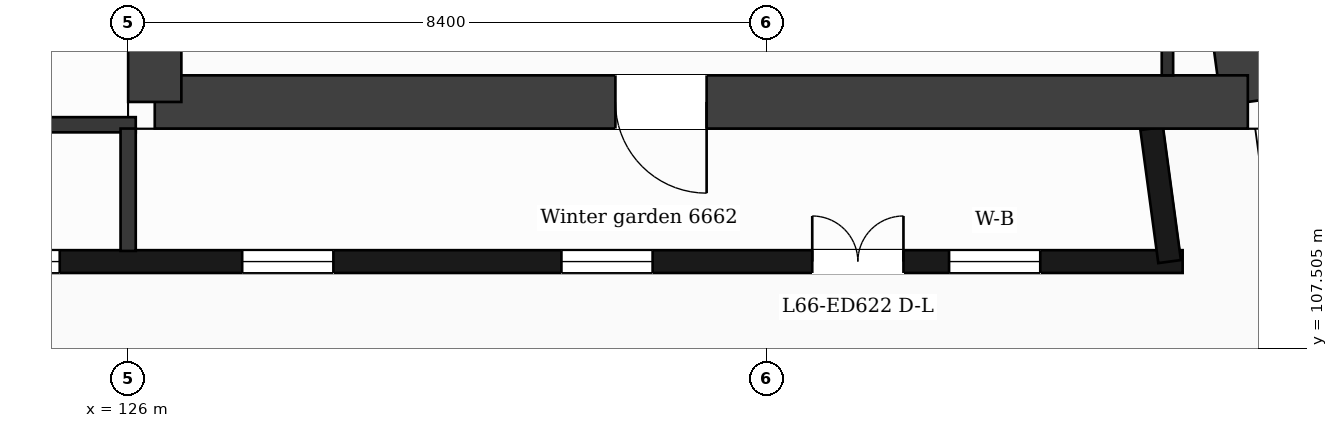
"""IFC4 building model, lengths in metres.
Left out: names, types, materials, properties, quantities, classifications, styles, units other than length and angle.
Written with IfcOpenShell. Run it as: python <this file> out.ifc"""

import sys

from ifc_helpers import new_model, si_unit, direction, frame, frame_2d, origin, place, context, subcontext, project, spatial, rectangle, extrude, element, fill, save


model = new_model("IFC4")
c1 = context("Model", 3, precision=1e-05, world=origin(), true_north=direction((0.0, 1.0)))
c2 = subcontext(c1, "Body", "Model", "MODEL_VIEW")
j1 = project(units=[si_unit("LENGTHUNIT", "METRE"), si_unit("PLANEANGLEUNIT", "RADIAN")], contexts=[c1])
p1 = place(None, origin())
s1 = spatial("IfcSite", under=j1, at=p1, CompositionType="ELEMENT")
p2 = place(p1, origin())
s2 = spatial("IfcBuilding", under=s1, at=p2, CompositionType="ELEMENT")
p3 = place(p2, frame((0.0, 0.0, 273.8)))
s3 = spatial("IfcBuildingStorey", under=s2, at=p3, CompositionType="ELEMENT", Elevation=273.8)
p4 = place(p3, frame((137.863, 132.05, 0.0), z_axis=(0.0, 0.0, 1.0), x_axis=(0.133406218907, -0.991061441464, 0.0)))
e1 = element("IfcWall", 1, at=p4, inside=s3, PredefinedType="SHEAR", context=c2, shape_type="SweptSolid", body=[
    extrude(rectangle(XDim=21.492, YDim=0.7, at=frame_2d((10.746, 0.0))), origin(), (0.0, 0.0, 1.0), 3.7),
])
p5 = place(p3, frame((140.73, 110.75, 0.0), z_axis=(0.0, 0.0, 1.0), x_axis=(-1.0, 0.0, 0.0)))
e2 = element("IfcWall", 2, at=p5, inside=s3, PredefinedType="SHEAR", context=c2, shape_type="SweptSolid", body=[
    extrude(rectangle(XDim=14.38, YDim=0.7, at=frame_2d((7.19, 0.0))), origin(), (0.0, 0.0, 1.0), 3.7),
])
p6 = place(p5, frame((7.12, 0.0, 0.0)))
e3 = element("IfcOpeningElement", 3, at=p6, cuts=e2, PredefinedType="OPENING", context=c2, shape_type="SweptSolid", body=[
    extrude(rectangle(XDim=1.2, YDim=2.1, at=frame_2d((0.6, 1.05))), frame((0.0, 0.36, 0.0), z_axis=(0.0, -1.0, 0.0), x_axis=(1.0, 0.0, 0.0)), (0.0, 0.0, 1.0), 0.72),
])
p7 = place(p3, frame((126.35, 110.75, 0.0), z_axis=(0.0, 0.0, 1.0), x_axis=(0.0, 1.0, 0.0)))
e4 = element("IfcWall", 4, at=p7, inside=s3, PredefinedType="SHEAR", context=c2, shape_type="SweptSolid", body=[
    extrude(rectangle(XDim=21.3, YDim=0.7, at=frame_2d((10.65, 0.0))), origin(), (0.0, 0.0, 1.0), 3.7),
])
p8 = place(p7, frame((12.0, 0.0, 0.0)))
e5 = element("IfcOpeningElement", 5, at=p8, cuts=e4, PredefinedType="OPENING", context=c2, shape_type="SweptSolid", body=[
    extrude(rectangle(XDim=1.4, YDim=2.1, at=frame_2d((0.7, 1.05))), frame((0.0, 0.36, 0.0), z_axis=(0.0, -1.0, 0.0), x_axis=(1.0, 0.0, 0.0)), (0.0, 0.0, 1.0), 0.72),
])
p9 = place(p3, frame((87.099, 108.65, 0.0), z_axis=(0.0, 0.0, 1.0), x_axis=(1.0, 0.0, 0.0)))
e6 = element("IfcWall", 6, at=p9, inside=s3, PredefinedType="SOLIDWALL", context=c2, shape_type="SweptSolid", body=[
    extrude(rectangle(XDim=52.774, YDim=0.3, at=frame_2d((26.387, 0.0))), origin(), (0.0, 0.0, 1.0), 3.38),
])
p10 = place(p9, frame((2.001, 0.0, 0.9)))
e7 = element("IfcOpeningElement", 7, at=p10, cuts=e6, PredefinedType="OPENING", context=c2, shape_type="SweptSolid", body=[
    extrude(rectangle(XDim=2.4, YDim=2.1, at=frame_2d((1.2, 1.05))), frame((0.0, 0.16, 0.0), z_axis=(0.0, -1.0, 0.0), x_axis=(1.0, 0.0, 0.0)), (0.0, 0.0, 1.0), 0.32),
])
p11 = place(p9, frame((6.201, 0.0, 0.9)))
e8 = element("IfcOpeningElement", 8, at=p11, cuts=e6, PredefinedType="OPENING", context=c2, shape_type="SweptSolid", body=[
    extrude(rectangle(XDim=2.4, YDim=2.1, at=frame_2d((1.2, 1.05))), frame((0.0, 0.16, 0.0), z_axis=(0.0, -1.0, 0.0), x_axis=(1.0, 0.0, 0.0)), (0.0, 0.0, 1.0), 0.32),
])
p12 = place(p9, frame((11.001, 0.0, 0.9)))
e9 = element("IfcOpeningElement", 9, at=p12, cuts=e6, PredefinedType="OPENING", context=c2, shape_type="SweptSolid", body=[
    extrude(rectangle(XDim=1.2, YDim=2.1, at=frame_2d((0.6, 1.05))), frame((0.0, 0.16, 0.0), z_axis=(0.0, -1.0, 0.0), x_axis=(1.0, 0.0, 0.0)), (0.0, 0.0, 1.0), 0.32),
])
p13 = place(p9, frame((15.201, 0.0, 0.9)))
e10 = element("IfcOpeningElement", 10, at=p13, cuts=e6, PredefinedType="OPENING", context=c2, shape_type="SweptSolid", body=[
    extrude(rectangle(XDim=1.2, YDim=2.1, at=frame_2d((0.6, 1.05))), frame((0.0, 0.16, 0.0), z_axis=(0.0, -1.0, 0.0), x_axis=(1.0, 0.0, 0.0)), (0.0, 0.0, 1.0), 0.32),
])
p14 = place(p9, frame((18.802, 0.0, 0.9)))
e11 = element("IfcOpeningElement", 11, at=p14, cuts=e6, PredefinedType="OPENING", context=c2, shape_type="SweptSolid", body=[
    extrude(rectangle(XDim=2.4, YDim=2.1, at=frame_2d((1.2, 1.05))), frame((0.0, 0.16, 0.0), z_axis=(0.0, -1.0, 0.0), x_axis=(1.0, 0.0, 0.0)), (0.0, 0.0, 1.0), 0.32),
])
p15 = place(p9, frame((23.001, 0.0, 0.9)))
e12 = element("IfcOpeningElement", 12, at=p15, cuts=e6, PredefinedType="OPENING", context=c2, shape_type="SweptSolid", body=[
    extrude(rectangle(XDim=2.4, YDim=2.1, at=frame_2d((1.2, 1.05))), frame((0.0, 0.16, 0.0), z_axis=(0.0, -1.0, 0.0), x_axis=(1.0, 0.0, 0.0)), (0.0, 0.0, 1.0), 0.32),
])
p16 = place(p9, frame((27.201, 0.0, 0.9)))
e13 = element("IfcOpeningElement", 13, at=p16, cuts=e6, PredefinedType="OPENING", context=c2, shape_type="SweptSolid", body=[
    extrude(rectangle(XDim=2.4, YDim=2.1, at=frame_2d((1.2, 1.05))), frame((0.0, 0.16, 0.0), z_axis=(0.0, -1.0, 0.0), x_axis=(1.0, 0.0, 0.0)), (0.0, 0.0, 1.0), 0.32),
])
p17 = place(p9, frame((31.401, 0.0, 0.9)))
e14 = element("IfcOpeningElement", 14, at=p17, cuts=e6, PredefinedType="OPENING", context=c2, shape_type="SweptSolid", body=[
    extrude(rectangle(XDim=2.4, YDim=2.1, at=frame_2d((1.2, 1.05))), frame((0.0, 0.16, 0.0), z_axis=(0.0, -1.0, 0.0), x_axis=(1.0, 0.0, 0.0)), (0.0, 0.0, 1.0), 0.32),
])
p18 = place(p9, frame((35.602, 0.0, 0.9)))
e15 = element("IfcOpeningElement", 15, at=p18, cuts=e6, PredefinedType="OPENING", context=c2, shape_type="SweptSolid", body=[
    extrude(rectangle(XDim=2.4, YDim=2.1, at=frame_2d((1.2, 1.05))), frame((0.0, 0.16, 0.0), z_axis=(0.0, -1.0, 0.0), x_axis=(1.0, 0.0, 0.0)), (0.0, 0.0, 1.0), 0.32),
])
p19 = place(p9, frame((40.401, 0.0, 0.9)))
e16 = element("IfcOpeningElement", 16, at=p19, cuts=e6, PredefinedType="OPENING", context=c2, shape_type="SweptSolid", body=[
    extrude(rectangle(XDim=1.2, YDim=2.1, at=frame_2d((0.6, 1.05))), frame((0.0, 0.16, 0.0), z_axis=(0.0, -1.0, 0.0), x_axis=(1.0, 0.0, 0.0)), (0.0, 0.0, 1.0), 0.32),
])
p20 = place(p9, frame((44.602, 0.0, 0.9)))
e17 = element("IfcOpeningElement", 17, at=p20, cuts=e6, PredefinedType="OPENING", context=c2, shape_type="SweptSolid", body=[
    extrude(rectangle(XDim=1.2, YDim=2.1, at=frame_2d((0.6, 1.05))), frame((0.0, 0.16, 0.0), z_axis=(0.0, -1.0, 0.0), x_axis=(1.0, 0.0, 0.0)), (0.0, 0.0, 1.0), 0.32),
])
p21 = place(p9, frame((47.901, 0.0, 0.0)))
e18 = element("IfcOpeningElement", 18, at=p21, cuts=e6, PredefinedType="OPENING", context=c2, shape_type="SweptSolid", body=[
    extrude(rectangle(XDim=1.2, YDim=2.4, at=frame_2d((0.6, 1.2))), frame((0.0, 0.16, 0.0), z_axis=(0.0, -1.0, 0.0), x_axis=(1.0, 0.0, 0.0)), (0.0, 0.0, 1.0), 0.32),
])
p22 = place(p9, frame((49.701, 0.0, 0.9)))
e19 = element("IfcOpeningElement", 19, at=p22, cuts=e6, PredefinedType="OPENING", context=c2, shape_type="SweptSolid", body=[
    extrude(rectangle(XDim=1.2, YDim=2.1, at=frame_2d((0.6, 1.05))), frame((0.0, 0.16, 0.0), z_axis=(0.0, -1.0, 0.0), x_axis=(1.0, 0.0, 0.0)), (0.0, 0.0, 1.0), 0.32),
])
p23 = place(p3, frame((139.701, 108.65, 0.0), z_axis=(0.0, 0.0, 1.0), x_axis=(-0.133422458344, 0.991059255347, 0.0)))
e20 = element("IfcWall", 20, at=p23, inside=s3, PredefinedType="SOLIDWALL", context=c2, shape_type="SweptSolid", body=[
    extrude(rectangle(XDim=1.766, YDim=0.3, at=frame_2d((0.883, 0.0))), origin(), (0.0, 0.0, 1.0), 3.38),
])
p24 = place(p3, frame((100.7, 110.45, 0.0), z_axis=(0.0, 0.0, 1.0), x_axis=(1.0, 0.0, 0.0)))
e21 = element("IfcWall", 21, at=p24, inside=s3, PredefinedType="PARTITIONING", context=c2, shape_type="SweptSolid", body=[
    extrude(rectangle(XDim=25.4, YDim=0.2, at=frame_2d((12.7, 0.0))), origin(), (0.0, 0.0, 1.0), 3.38),
])
p25 = place(p3, frame((126.0, 108.79, 0.0), z_axis=(0.0, 0.0, 1.0), x_axis=(0.0, 1.0, 0.0)))
e22 = element("IfcWall", 22, at=p25, inside=s3, PredefinedType="PARTITIONING", context=c2, shape_type="SweptSolid", body=[
    extrude(rectangle(XDim=1.61, YDim=0.2, at=frame_2d((0.805, 0.0))), origin(), (0.0, 0.0, 1.0), 3.38),
])
p26 = place(p3, frame((139.673, 111.1, 0.0), z_axis=(0.0, 0.0, 1.0), x_axis=(0.0, 1.0, 0.0)))
e23 = element("IfcWall", 23, at=p26, inside=s3, PredefinedType="PARTITIONING", context=c2, shape_type="SweptSolid", body=[
    extrude(rectangle(XDim=1.8, YDim=0.15, at=frame_2d((0.9, 0.0))), origin(), (0.0, 0.0, 1.0), 3.38),
])
p27 = place(p18, origin())
e24 = element("IfcWindow", 24, at=p27, inside=s3, PartitioningType="SINGLE_PANEL", PredefinedType="WINDOW", context=c2, shape_type="SweptSolid", body=[
    extrude(rectangle(XDim=2.4, YDim=2.1, at=frame_2d((1.2, 1.05))), frame((0.0, 0.03, 0.0), z_axis=(0.0, -1.0, 0.0), x_axis=(1.0, 0.0, 0.0)), (0.0, 0.0, 1.0), 0.06),
])
fill(e15, e24)
p28 = place(p19, origin())
e25 = element("IfcWindow", 25, at=p28, inside=s3, PartitioningType="SINGLE_PANEL", PredefinedType="WINDOW", context=c2, shape_type="SweptSolid", body=[
    extrude(rectangle(XDim=1.2, YDim=2.1, at=frame_2d((0.6, 1.05))), frame((0.0, 0.03, 0.0), z_axis=(0.0, -1.0, 0.0), x_axis=(1.0, 0.0, 0.0)), (0.0, 0.0, 1.0), 0.06),
])
fill(e16, e25)
p29 = place(p20, origin())
e26 = element("IfcWindow", 26, at=p29, inside=s3, PartitioningType="SINGLE_PANEL", PredefinedType="WINDOW", context=c2, shape_type="SweptSolid", body=[
    extrude(rectangle(XDim=1.2, YDim=2.1, at=frame_2d((0.6, 1.05))), frame((0.0, 0.03, 0.0), z_axis=(0.0, -1.0, 0.0), x_axis=(1.0, 0.0, 0.0)), (0.0, 0.0, 1.0), 0.06),
])
fill(e17, e26)
p30 = place(p21, origin())
e27 = element("IfcDoor", 27, at=p30, inside=s3, OperationType="DOUBLE_DOOR_SINGLE_SWING", PredefinedType="DOOR", context=c2, shape_type="SweptSolid", body=[
    extrude(rectangle(XDim=1.2, YDim=2.4, at=frame_2d((0.6, 1.2))), frame((0.0, 0.025, 0.0), z_axis=(0.0, -1.0, 0.0), x_axis=(1.0, 0.0, 0.0)), (0.0, 0.0, 1.0), 0.05),
])
fill(e18, e27)
p31 = place(p22, origin())
e28 = element("IfcWindow", 28, at=p31, inside=s3, PartitioningType="SINGLE_PANEL", PredefinedType="WINDOW", context=c2, shape_type="SweptSolid", body=[
    extrude(rectangle(XDim=1.2, YDim=2.1, at=frame_2d((0.6, 1.05))), frame((0.0, 0.03, 0.0), z_axis=(0.0, -1.0, 0.0), x_axis=(1.0, 0.0, 0.0)), (0.0, 0.0, 1.0), 0.06),
])
fill(e19, e28)
p32 = place(p6, origin())
e29 = element("IfcDoor", 29, at=p32, inside=s3, OperationType="SINGLE_SWING_LEFT", PredefinedType="DOOR", context=c2, shape_type="SweptSolid", body=[
    extrude(rectangle(XDim=1.2, YDim=2.1, at=frame_2d((0.6, 1.05))), frame((0.0, 0.025, 0.0), z_axis=(0.0, -1.0, 0.0), x_axis=(1.0, 0.0, 0.0)), (0.0, 0.0, 1.0), 0.05),
])
fill(e3, e29)
save(model, sys.argv[1])
